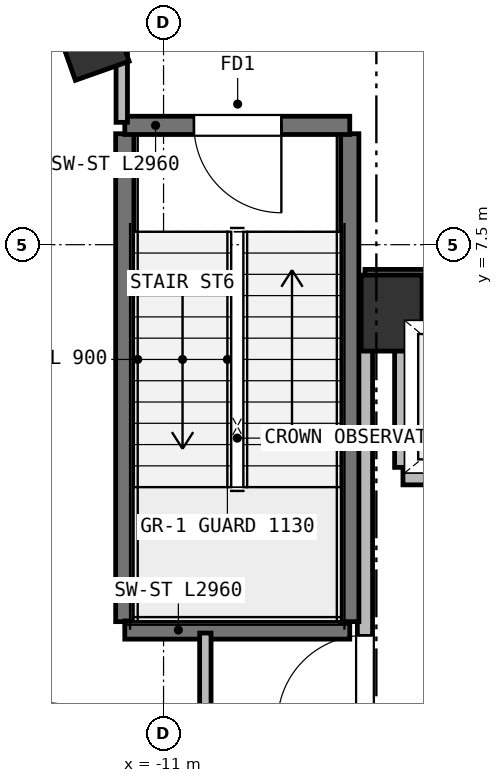
"""IFC4 building model, lengths in metres.
Left out: names, types, materials, properties, quantities, classifications, styles, units other than length and angle.
Written with IfcOpenShell. Run it as: python <this file> out.ifc"""

import sys

from ifc_helpers import new_model, si_unit, direction, frame, frame_2d, origin, origin_2d, place, context, subcontext, project, spatial, rectangle, extrude, element, fill, save


model = new_model("IFC4")
c1 = context("Model", 3, precision=1e-05, world=origin(), true_north=direction((0.0, 1.0)))
c2 = subcontext(c1, "Body", "Model", "MODEL_VIEW")
j1 = project(units=[si_unit("LENGTHUNIT", "METRE"), si_unit("PLANEANGLEUNIT", "RADIAN")], contexts=[c1])
p1 = place(None, origin())
s1 = spatial("IfcSite", under=j1, at=p1, CompositionType="ELEMENT")
p2 = place(p1, origin())
s2 = spatial("IfcBuilding", under=s1, at=p2, CompositionType="ELEMENT")
p3 = place(p2, frame((0.0, 0.0, 277.2)))
s3 = spatial("IfcBuildingStorey", under=s2, at=p3, CompositionType="ELEMENT", Elevation=277.2)
p4 = place(p3, frame((-8.0, 6.6, 0.0), z_axis=(0.0, 0.0, 1.0), x_axis=(1.0, 0.0, 0.0)))
e1 = element("IfcColumn", 1, at=p4, inside=s3, PredefinedType="COLUMN", context=c2, shape_type="SweptSolid", body=[
    extrude(rectangle(XDim=0.8, YDim=1.0, at=origin_2d()), origin(), (0.0, 0.0, 1.0), 4.4),
])
p5 = place(p3, frame((-8.35, 6.95, 0.0), z_axis=(0.0, 0.0, 1.0), x_axis=(1.0, 0.0, 0.0)))
e2 = element("IfcWall", 2, at=p5, inside=s3, PredefinedType="SHEAR", context=c2, shape_type="SweptSolid", body=[
    extrude(rectangle(XDim=16.7, YDim=0.45, at=frame_2d((8.35, 0.0))), origin(), (0.0, 0.0, 1.0), 4.15),
])
p6 = place(p3, frame((-11.957, 10.212, 0.0), z_axis=(0.0, 0.0, 1.0), x_axis=(0.942641491092, 0.333806859234, 0.0)))
e3 = element("IfcColumn", 3, at=p6, inside=s3, PredefinedType="COLUMN", context=c2, shape_type="SweptSolid", body=[
    extrude(rectangle(XDim=0.75, YDim=0.9, at=origin_2d()), origin(), (0.0, 0.0, 1.0), 4.4),
])
p7 = place(p3, frame((-14.021, 9.694, 0.0), z_axis=(0.0, 0.0, 1.0), x_axis=(0.873970841772, 0.485978361383, 0.0)))
e4 = element("IfcWall", 4, at=p7, inside=s3, PredefinedType="SOLIDWALL", context=c2, shape_type="SweptSolid", body=[
    extrude(rectangle(XDim=2.472, YDim=0.33, at=frame_2d((1.236, 0.0))), origin(), (0.0, 0.0, 1.0), 4.15),
])
p8 = place(p3, frame((-7.85, 4.45, 0.0), z_axis=(0.0, 0.0, 1.0), x_axis=(1.0, 0.0, 0.0)))
e5 = element("IfcWall", 5, at=p8, inside=s3, PredefinedType="PARTITIONING", context=c2, shape_type="SweptSolid", body=[
    extrude(rectangle(XDim=2.5, YDim=0.22, at=frame_2d((1.25, 0.0))), origin(), (0.0, 0.0, 1.0), 4.15),
])
p9 = place(p8, frame((0.66, 0.0, 0.0)))
e6 = element("IfcOpeningElement", 6, at=p9, cuts=e5, PredefinedType="OPENING", context=c2, shape_type="SweptSolid", body=[
    extrude(rectangle(XDim=1.18, YDim=2.15, at=frame_2d((0.59, 1.075))), frame((0.0, 0.12, 0.0), z_axis=(0.0, -1.0, 0.0), x_axis=(1.0, 0.0, 0.0)), (0.0, 0.0, 1.0), 0.24),
])
p10 = place(p3, frame((-7.85, 4.57, 0.0), z_axis=(0.0, 0.0, 1.0), x_axis=(0.0, 1.0, 0.0)))
e7 = element("IfcWall", 7, at=p10, inside=s3, PredefinedType="PARTITIONING", context=c2, shape_type="SweptSolid", body=[
    extrude(rectangle(XDim=2.155, YDim=0.22, at=frame_2d((1.078, 0.0))), origin(), (0.0, 0.0, 1.0), 3.83),
])
p11 = place(p3, frame((-8.35, 1.15, 0.0), z_axis=(0.0, 0.0, 1.0), x_axis=(0.0, 1.0, 0.0)))
e8 = element("IfcWall", 8, at=p11, inside=s3, PredefinedType="PARTITIONING", context=c2, shape_type="SweptSolid", body=[
    extrude(rectangle(XDim=5.4, YDim=0.2, at=frame_2d((2.7, 0.0))), origin(), (0.0, 0.0, 1.0), 4.15),
])
p12 = place(p11, frame((0.06, 0.0, 0.0)))
e9 = element("IfcOpeningElement", 9, at=p12, cuts=e8, PredefinedType="OPENING", context=c2, shape_type="SweptSolid", body=[
    extrude(rectangle(XDim=1.15, YDim=2.15, at=frame_2d((0.575, 1.075))), frame((0.0, 0.11, 0.0), z_axis=(0.0, -1.0, 0.0), x_axis=(1.0, 0.0, 0.0)), (0.0, 0.0, 1.0), 0.22),
])
p13 = place(p3, frame((-11.51, 2.54, 0.0), z_axis=(0.0, 0.0, 1.0), x_axis=(0.0, 1.0, 0.0)))
e10 = element("IfcWall", 10, at=p13, inside=s3, PredefinedType="SHEAR", context=c2, shape_type="SweptSolid", body=[
    extrude(rectangle(XDim=6.42, YDim=0.24, at=frame_2d((3.21, 0.0))), origin(), (0.0, 0.0, 1.0), 4.15),
])
p14 = place(p3, frame((-11.51, 2.43, 0.0), z_axis=(0.0, 0.0, 1.0), x_axis=(1.0, 0.0, 0.0)))
e11 = element("IfcWall", 11, at=p14, inside=s3, PredefinedType="SHEAR", context=c2, shape_type="SweptSolid", body=[
    extrude(rectangle(XDim=2.96, YDim=0.24, at=frame_2d((1.48, 0.0))), origin(), (0.0, 0.0, 1.0), 4.15),
])
p15 = place(p3, frame((-8.55, 2.54, 0.0), z_axis=(0.0, 0.0, 1.0), x_axis=(0.0, 1.0, 0.0)))
e12 = element("IfcWall", 12, at=p15, inside=s3, PredefinedType="SHEAR", context=c2, shape_type="SweptSolid", body=[
    extrude(rectangle(XDim=6.42, YDim=0.24, at=frame_2d((3.21, 0.0))), origin(), (0.0, 0.0, 1.0), 4.15),
])
p16 = place(p3, frame((-8.55, 9.07, 0.0), z_axis=(0.0, 0.0, 1.0), x_axis=(-1.0, 0.0, 0.0)))
e13 = element("IfcWall", 13, at=p16, inside=s3, PredefinedType="SHEAR", context=c2, shape_type="SweptSolid", body=[
    extrude(rectangle(XDim=2.96, YDim=0.24, at=frame_2d((1.48, 0.0))), origin(), (0.0, 0.0, 1.0), 4.15),
])
p17 = place(p16, frame((0.9, 0.0, 0.0)))
e14 = element("IfcOpeningElement", 14, at=p17, cuts=e13, PredefinedType="OPENING", context=c2, shape_type="SweptSolid", body=[
    extrude(rectangle(XDim=1.15, YDim=2.15, at=frame_2d((0.575, 1.075))), frame((0.0, 0.13, 0.0), z_axis=(0.0, -1.0, 0.0), x_axis=(1.0, 0.0, 0.0)), (0.0, 0.0, 1.0), 0.26),
])
p18 = place(p3, frame((-11.55, 9.11, 0.0), z_axis=(0.0, 0.0, 1.0), x_axis=(0.0, 1.0, 0.0)))
e15 = element("IfcWall", 15, at=p18, inside=s3, PredefinedType="PARTITIONING", context=c2, shape_type="SweptSolid", body=[
    extrude(rectangle(XDim=1.37, YDim=0.15, at=frame_2d((0.685, 0.0))), origin(), (0.0, 0.0, 1.0), 4.15),
])
p19 = place(p3, frame((-10.45, -7.24, 0.0), z_axis=(0.0, 0.0, 1.0), x_axis=(0.0, 1.0, 0.0)))
e16 = element("IfcWall", 16, at=p19, inside=s3, PredefinedType="PARTITIONING", context=c2, shape_type="SweptSolid", body=[
    extrude(rectangle(XDim=9.63, YDim=0.15, at=frame_2d((4.815, 0.0))), origin(), (0.0, 0.0, 1.0), 4.15),
])
p20 = place(p19, frame((3.829, 0.0, 0.0)))
e17 = element("IfcOpeningElement", 17, at=p20, cuts=e16, PredefinedType="OPENING", context=c2, shape_type="SweptSolid", body=[
    extrude(rectangle(XDim=1.0, YDim=2.15, at=frame_2d((0.5, 1.075))), frame((0.0, 0.085, 0.0), z_axis=(0.0, -1.0, 0.0), x_axis=(1.0, 0.0, 0.0)), (0.0, 0.0, 1.0), 0.17),
])
p21 = place(p3, frame((-10.45, 1.137, 0.0), z_axis=(0.0, 0.0, 1.0), x_axis=(-0.994132831071, 0.108166141594, 0.0)))
e18 = element("IfcWall", 18, at=p21, inside=s3, PredefinedType="PARTITIONING", context=c2, shape_type="SweptSolid", body=[
    extrude(rectangle(XDim=10.789, YDim=0.18, at=frame_2d((5.395, 0.0))), origin(), (0.0, 0.0, 1.0), 4.15),
])
p22 = place(p12, origin())
e19 = element("IfcDoor", 19, at=p22, inside=s3, OperationType="SINGLE_SWING_LEFT", PredefinedType="DOOR", context=c2, shape_type="SweptSolid", body=[
    extrude(rectangle(XDim=1.15, YDim=2.15, at=frame_2d((0.575, 1.075))), frame((0.0, 0.025, 0.0), z_axis=(0.0, -1.0, 0.0), x_axis=(1.0, 0.0, 0.0)), (0.0, 0.0, 1.0), 0.05),
])
fill(e9, e19)
p23 = place(p17, origin())
e20 = element("IfcDoor", 20, at=p23, inside=s3, OperationType="SINGLE_SWING_LEFT", PredefinedType="DOOR", context=c2, shape_type="SweptSolid", body=[
    extrude(rectangle(XDim=1.15, YDim=2.15, at=frame_2d((0.575, 1.075))), frame((0.0, 0.025, 0.0), z_axis=(0.0, -1.0, 0.0), x_axis=(1.0, 0.0, 0.0)), (0.0, 0.0, 1.0), 0.05),
])
fill(e14, e20)
save(model, sys.argv[1])
